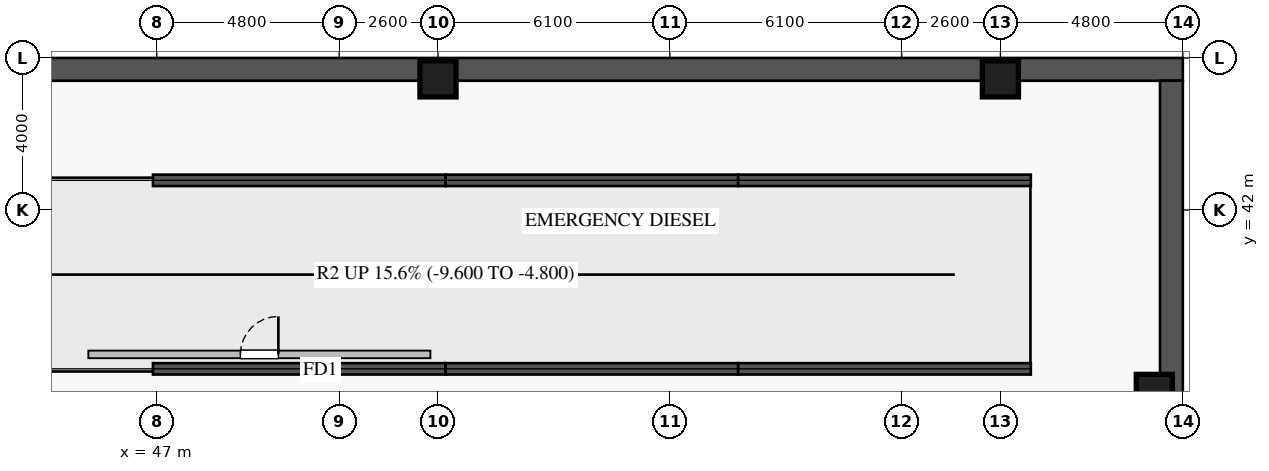
"""IFC4 building model, lengths in metres.
Left out: names, types, materials, properties, quantities, classifications, styles, units other than length and angle.
Written with IfcOpenShell. Run it as: python <this file> out.ifc"""

import sys

from ifc_helpers import new_model, si_unit, direction, frame, frame_2d, origin, origin_2d, place, context, subcontext, project, spatial, rectangle, extrude, source, transform, mapped, element, fill, save


model = new_model("IFC4")
c1 = context("Model", 3, precision=1e-05, world=origin(), true_north=direction((0.0, 1.0)))
c2 = subcontext(c1, "Body", "Model", "MODEL_VIEW")
j1 = project(units=[si_unit("LENGTHUNIT", "METRE"), si_unit("PLANEANGLEUNIT", "RADIAN")], contexts=[c1])
p1 = place(None, origin())
s1 = spatial("IfcSite", under=j1, at=p1, CompositionType="ELEMENT")
p2 = place(p1, origin())
s2 = spatial("IfcBuilding", under=s1, at=p2, CompositionType="ELEMENT")
p3 = place(p2, frame((0.0, 0.0, -9.6)))
s3 = spatial("IfcBuildingStorey", under=s2, at=p3, CompositionType="ELEMENT", Elevation=-9.6)
p4 = place(p3, frame((0.0, 45.7, 0.0), z_axis=(0.0, 0.0, 1.0), x_axis=(1.0, 0.0, 0.0)))
e1 = element("IfcWall", 1, at=p4, inside=s3, PredefinedType="SOLIDWALL", context=c2, shape_type="SweptSolid", body=[
    extrude(rectangle(XDim=74.0, YDim=0.6, at=frame_2d((37.0, 0.0))), origin(), (0.0, 0.0, 1.0), 4.8),
])
p5 = place(p3, frame((73.7, 0.6, 0.0), z_axis=(0.0, 0.0, 1.0), x_axis=(0.0, 1.0, 0.0)))
e2 = element("IfcWall", 2, at=p5, inside=s3, PredefinedType="SOLIDWALL", context=c2, shape_type="SweptSolid", body=[
    extrude(rectangle(XDim=44.8, YDim=0.6, at=frame_2d((22.4, 0.0))), origin(), (0.0, 0.0, 1.0), 4.8),
])
m1 = source(origin(), c2, "Body", "SweptSolid", [
    extrude(rectangle(XDim=0.95, YDim=0.95, at=origin_2d()), origin(), (0.0, 0.0, 1.0), 4.8),
])
for number, where, z_axis, x_axis in (
    (3, (54.4, 45.45, 0.0), (0.0, 0.0, 1.0), (1.0, 0.0, 0.0)),
    (4, (69.2, 45.45, 0.0), (0.0, 0.0, 1.0), (1.0, 0.0, 0.0)),
    (5, (73.25, 37.2, 0.0), (0.0, 0.0, 1.0), (1.0, 0.0, 0.0)),
):
    element("IfcColumn", number, at=place(p3, frame(where, z_axis=z_axis, x_axis=x_axis)), inside=s3, PredefinedType="COLUMN", context=c2, shape_type="MappedRepresentation", body=[
        mapped(m1, transform((0.0, 0.0, 0.0), x_axis=(1.0, 0.0, 0.0), y_axis=(0.0, 1.0, 0.0), z_axis=(0.0, 0.0, 1.0), scale=1.0)),
    ])
p6 = place(p3, frame((45.2, 38.2, 0.0), z_axis=(0.0, 0.0, 1.0), x_axis=(1.0, 0.0, 0.0)))
e6 = element("IfcWall", 6, at=p6, inside=s3, PredefinedType="PARTITIONING", context=c2, shape_type="SweptSolid", body=[
    extrude(rectangle(XDim=9.0, YDim=0.2, at=frame_2d((4.5, 0.0))), origin(), (0.0, 0.0, 1.0), 4.58),
])
p7 = place(p6, frame((4.0, 0.0, 0.0)))
e7 = element("IfcOpeningElement", 7, at=p7, cuts=e6, PredefinedType="OPENING", context=c2, shape_type="SweptSolid", body=[
    extrude(rectangle(XDim=1.0, YDim=2.05, at=frame_2d((0.5, 1.025))), frame((0.0, 0.11, 0.0), z_axis=(0.0, -1.0, 0.0), x_axis=(1.0, 0.0, 0.0)), (0.0, 0.0, 1.0), 0.22),
])
p8 = place(p3, frame((46.9, 37.82, 0.0), z_axis=(0.0, 0.0, 1.0), x_axis=(1.0, 0.0, 0.0)))
e8 = element("IfcWall", 8, at=p8, inside=s3, PredefinedType="SOLIDWALL", context=c2, shape_type="SweptSolid", body=[
    extrude(rectangle(XDim=7.7, YDim=0.3, at=frame_2d((3.85, 0.0))), origin(), (0.0, 0.0, 1.0), 0.94),
])
p9 = place(p3, frame((54.6, 37.82, 0.0), z_axis=(0.0, 0.0, 1.0), x_axis=(1.0, 0.0, 0.0)))
e9 = element("IfcWall", 9, at=p9, inside=s3, PredefinedType="SOLIDWALL", context=c2, shape_type="SweptSolid", body=[
    extrude(rectangle(XDim=7.7, YDim=0.3, at=frame_2d((3.85, 0.0))), origin(), (0.0, 0.0, 1.0), 2.14),
])
p10 = place(p3, frame((62.3, 37.82, 0.0), z_axis=(0.0, 0.0, 1.0), x_axis=(1.0, 0.0, 0.0)))
e10 = element("IfcWall", 10, at=p10, inside=s3, PredefinedType="SOLIDWALL", context=c2, shape_type="SweptSolid", body=[
    extrude(rectangle(XDim=7.7, YDim=0.3, at=frame_2d((3.85, 0.0))), origin(), (0.0, 0.0, 1.0), 3.34),
])
p11 = place(p3, frame((46.9, 42.78, 0.0), z_axis=(0.0, 0.0, 1.0), x_axis=(1.0, 0.0, 0.0)))
e11 = element("IfcWall", 11, at=p11, inside=s3, PredefinedType="SOLIDWALL", context=c2, shape_type="SweptSolid", body=[
    extrude(rectangle(XDim=7.7, YDim=0.3, at=frame_2d((3.85, 0.0))), origin(), (0.0, 0.0, 1.0), 0.94),
])
p12 = place(p3, frame((54.6, 42.78, 0.0), z_axis=(0.0, 0.0, 1.0), x_axis=(1.0, 0.0, 0.0)))
e12 = element("IfcWall", 12, at=p12, inside=s3, PredefinedType="SOLIDWALL", context=c2, shape_type="SweptSolid", body=[
    extrude(rectangle(XDim=7.7, YDim=0.3, at=frame_2d((3.85, 0.0))), origin(), (0.0, 0.0, 1.0), 2.14),
])
p13 = place(p3, frame((62.3, 42.78, 0.0), z_axis=(0.0, 0.0, 1.0), x_axis=(1.0, 0.0, 0.0)))
e13 = element("IfcWall", 13, at=p13, inside=s3, PredefinedType="SOLIDWALL", context=c2, shape_type="SweptSolid", body=[
    extrude(rectangle(XDim=7.7, YDim=0.3, at=frame_2d((3.85, 0.0))), origin(), (0.0, 0.0, 1.0), 3.34),
])
m2 = source(origin(), c2, "Body", "SweptSolid", [
    extrude(rectangle(XDim=1.0, YDim=2.05, at=frame_2d((0.5, 1.025))), frame((0.0, 0.025, 0.0), z_axis=(0.0, -1.0, 0.0), x_axis=(1.0, 0.0, 0.0)), (0.0, 0.0, 1.0), 0.05),
])
p14 = place(p7, origin())
e14 = element("IfcDoor", 14, at=p14, inside=s3, OperationType="SINGLE_SWING_RIGHT", PredefinedType="DOOR", context=c2, shape_type="MappedRepresentation", body=[
    mapped(m2, transform((0.0, 0.0, 0.0), x_axis=(1.0, 0.0, 0.0), y_axis=(0.0, 1.0, 0.0), z_axis=(0.0, 0.0, 1.0), scale=1.0)),
])
fill(e7, e14)
save(model, sys.argv[1])
